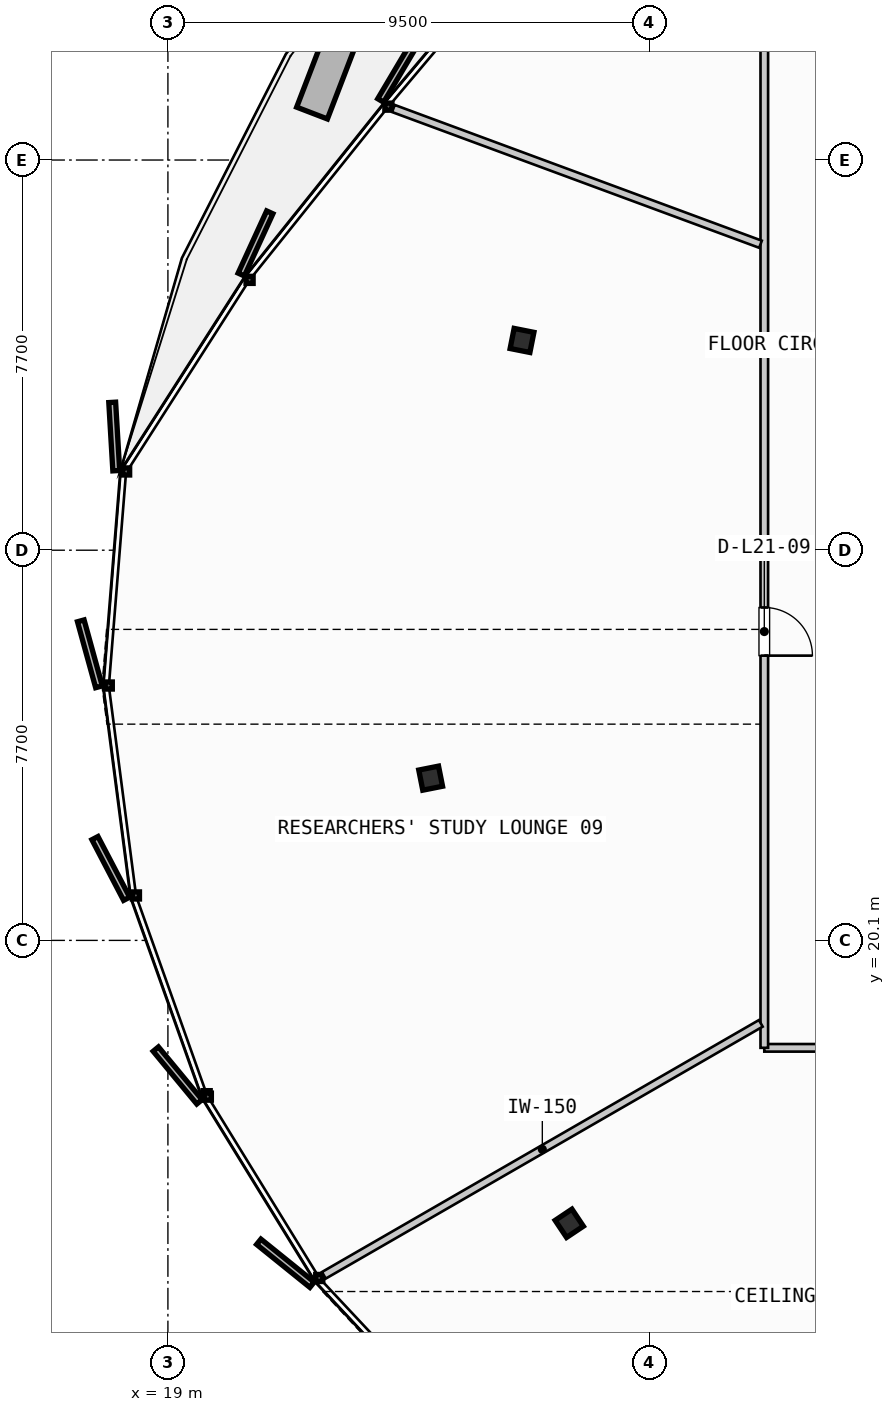
"""IFC4 building model, lengths in metres.
Left out: names, types, materials, properties, quantities, classifications, styles, units other than length and angle.
Written with IfcOpenShell. Run it as: python <this file> out.ifc"""

import sys

from ifc_helpers import new_model, si_unit, direction, frame, frame_2d, origin, origin_2d, place, context, subcontext, project, spatial, rectangle, i_section, extrude, source, transform, mapped, element, fill, save


model = new_model("IFC4")
c1 = context("Model", 3, precision=1e-05, world=origin(), true_north=direction((0.0, 1.0)))
c2 = subcontext(c1, "Body", "Model", "MODEL_VIEW")
j1 = project(units=[si_unit("LENGTHUNIT", "METRE"), si_unit("PLANEANGLEUNIT", "RADIAN")], contexts=[c1])
p1 = place(None, origin())
s1 = spatial("IfcSite", under=j1, at=p1, CompositionType="ELEMENT")
p2 = place(p1, origin())
s2 = spatial("IfcBuilding", under=s1, at=p2, CompositionType="ELEMENT")
p3 = place(p2, frame((0.0, 0.0, 89.2)))
s3 = spatial("IfcBuildingStorey", under=s2, at=p3, CompositionType="ELEMENT", Elevation=89.2)
m1 = source(origin(), c2, "Body", "SweptSolid", [
    extrude(i_section(OverallWidth=0.405, OverallDepth=0.398, WebThickness=0.035, FlangeThickness=0.056, FilletRadius=0.015, at=origin_2d()), origin(), (0.0, 0.0, 1.0), 3.35),
])
for number, where, z_axis, x_axis in (
    (1, (25.989, 31.94, 0.0), (0.0, 0.0, 1.0), (-0.981, 0.195, 0.0)),
    (2, (24.185, 23.302, 0.0), (0.0, 0.0, 1.0), (-0.981, -0.195, 0.0)),
    (3, (26.921, 14.517, 0.0), (0.0, 0.0, 1.0), (-0.831, -0.556, 0.0)),
):
    element("IfcColumn", number, at=place(p3, frame(where, z_axis=z_axis, x_axis=x_axis)), inside=s3, PredefinedType="COLUMN", context=c2, shape_type="MappedRepresentation", body=[
        mapped(m1, transform((0.0, 0.0, 0.0), scale=1.0)),
    ])
p4 = place(p3, frame((30.77, 17.98, 0.0), z_axis=(0.0, 0.0, 1.0), x_axis=(1.0, 0.0, 0.0)))
e4 = element("IfcWall", 4, at=p4, inside=s3, PredefinedType="PARTITIONING", context=c2, shape_type="SweptSolid", body=[
    extrude(rectangle(XDim=31.54, YDim=0.15, at=frame_2d((15.77, 0.0))), origin(), (0.0, 0.0, 1.0), 2.28),
])
p5 = place(p4, frame((5.88, 0.0, 0.0)))
e5 = element("IfcOpeningElement", 5, at=p5, cuts=e4, PredefinedType="OPENING", context=c2, shape_type="SweptSolid", body=[
    extrude(rectangle(XDim=0.95, YDim=2.15, at=frame_2d((0.475, 1.075))), frame((0.0, 0.085, 0.0), z_axis=(0.0, -1.0, 0.0), x_axis=(1.0, 0.0, 0.0)), (0.0, 0.0, 1.0), 0.17),
])
p6 = place(p4, frame((15.978, 0.0, 0.0)))
e6 = element("IfcOpeningElement", 6, at=p6, cuts=e4, PredefinedType="OPENING", context=c2, shape_type="SweptSolid", body=[
    extrude(rectangle(XDim=0.95, YDim=2.15, at=frame_2d((0.475, 1.075))), frame((0.0, 0.085, 0.0), z_axis=(0.0, -1.0, 0.0), x_axis=(1.0, 0.0, 0.0)), (0.0, 0.0, 1.0), 0.17),
])
p7 = place(p4, frame((23.812, 0.0, 0.0)))
e7 = element("IfcOpeningElement", 7, at=p7, cuts=e4, PredefinedType="OPENING", context=c2, shape_type="SweptSolid", body=[
    extrude(rectangle(XDim=0.95, YDim=2.15, at=frame_2d((0.475, 1.075))), frame((0.0, 0.085, 0.0), z_axis=(0.0, -1.0, 0.0), x_axis=(1.0, 0.0, 0.0)), (0.0, 0.0, 1.0), 0.17),
])
p8 = place(p3, frame((30.77, 38.04, 0.0), z_axis=(0.0, 0.0, 1.0), x_axis=(0.0, -1.0, 0.0)))
e8 = element("IfcWall", 8, at=p8, inside=s3, PredefinedType="PARTITIONING", context=c2, shape_type="SweptSolid", body=[
    extrude(rectangle(XDim=20.06, YDim=0.15, at=frame_2d((10.03, 0.0))), origin(), (0.0, 0.0, 1.0), 2.28),
])
p9 = place(p8, frame((11.37, 0.0, 0.0)))
e9 = element("IfcOpeningElement", 9, at=p9, cuts=e8, PredefinedType="OPENING", context=c2, shape_type="SweptSolid", body=[
    extrude(rectangle(XDim=0.95, YDim=2.15, at=frame_2d((0.475, 1.075))), frame((0.0, 0.085, 0.0), z_axis=(0.0, -1.0, 0.0), x_axis=(1.0, 0.0, 0.0)), (0.0, 0.0, 1.0), 0.17),
])
p10 = place(p3, frame((30.701, 18.463, 0.0), z_axis=(0.0, 0.0, 1.0), x_axis=(-0.866312143149, -0.499503023647, 0.0)))
e10 = element("IfcWall", 10, at=p10, inside=s3, PredefinedType="PARTITIONING", context=c2, shape_type="SweptSolid", body=[
    extrude(rectangle(XDim=9.954, YDim=0.15, at=frame_2d((4.977, 0.0))), origin(), (0.0, 0.0, 1.0), 2.28),
])
p11 = place(p3, frame((30.695, 33.838, 0.0), z_axis=(0.0, 0.0, 1.0), x_axis=(-0.937935058172, 0.346810937907, 0.0)))
e11 = element("IfcWall", 11, at=p11, inside=s3, PredefinedType="PARTITIONING", context=c2, shape_type="SweptSolid", body=[
    extrude(rectangle(XDim=7.725, YDim=0.15, at=frame_2d((3.862, 0.0))), origin(), (0.0, 0.0, 1.0), 2.28),
])
m2 = source(origin(), c2, "Body", "SweptSolid", [
    extrude(rectangle(XDim=0.95, YDim=2.15, at=frame_2d((0.475, 1.075))), frame((0.0, 0.025, 0.0), z_axis=(0.0, -1.0, 0.0), x_axis=(1.0, 0.0, 0.0)), (0.0, 0.0, 1.0), 0.05),
])
p12 = place(p9, origin())
e12 = element("IfcDoor", 12, at=p12, inside=s3, OperationType="SINGLE_SWING_RIGHT", PredefinedType="DOOR", context=c2, shape_type="MappedRepresentation", body=[
    mapped(m2, transform((0.0, 0.0, 0.0), scale=1.0)),
])
fill(e9, e12)
save(model, sys.argv[1])
